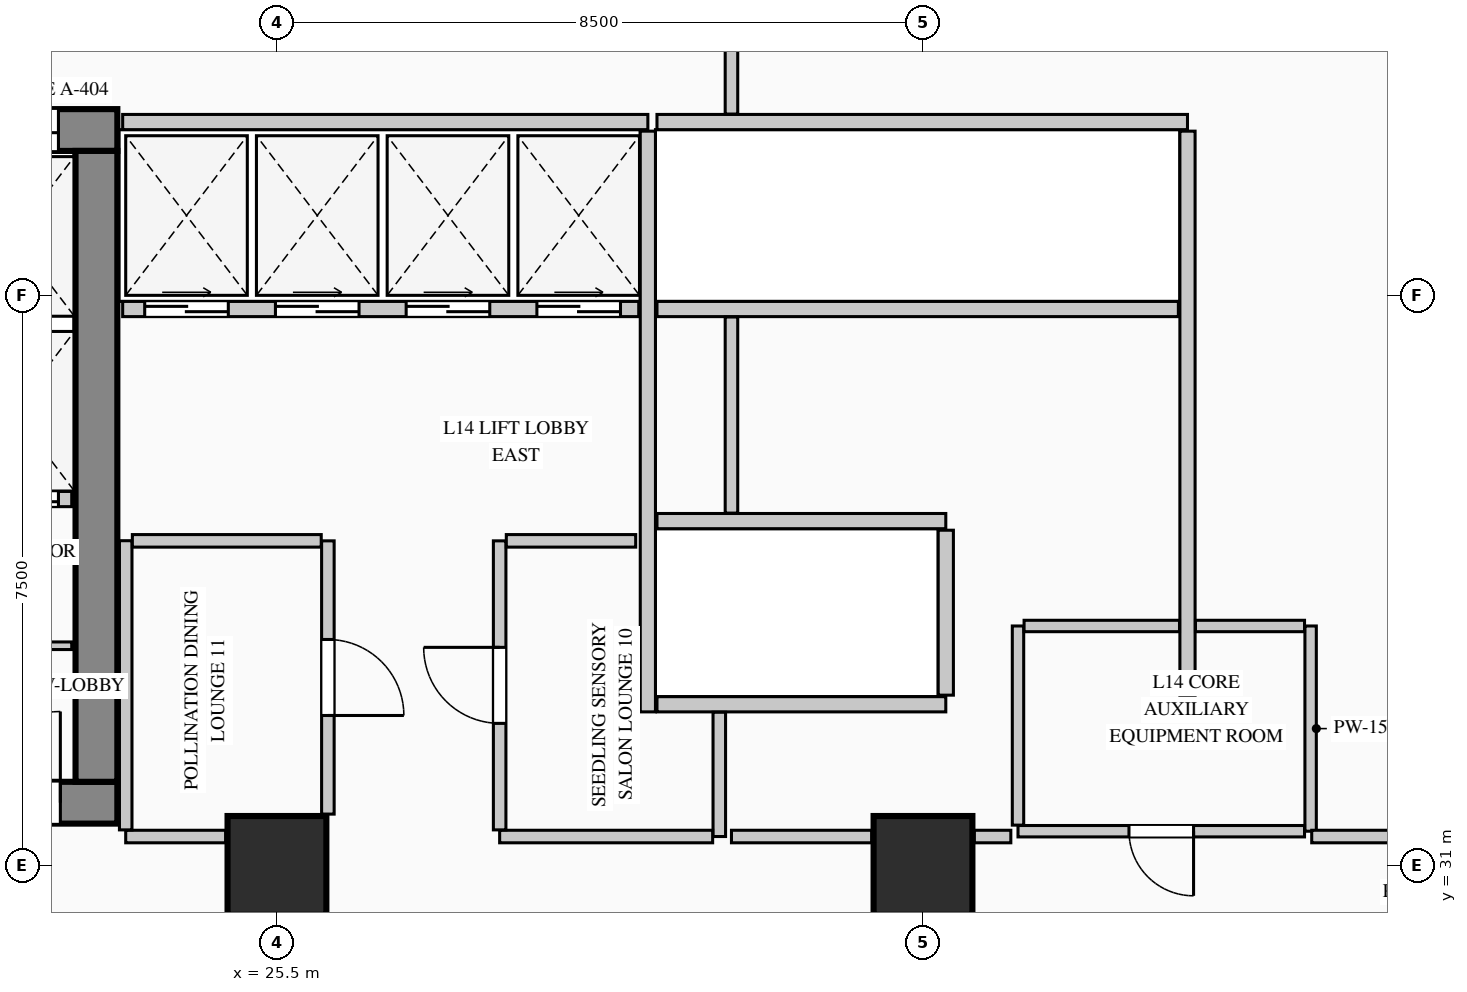
"""IFC4 building model, lengths in metres.
Left out: names, types, materials, properties, quantities, classifications, styles, units other than length and angle.
Written with IfcOpenShell. Run it as: python <this file> out.ifc"""

import sys

from ifc_helpers import new_model, si_unit, direction, frame, frame_2d, origin, origin_2d, place, context, subcontext, project, spatial, rectangle, extrude, element, fill, save


model = new_model("IFC4")
c1 = context("Model", 3, precision=1e-05, world=origin(), true_north=direction((0.0, 1.0)))
c2 = subcontext(c1, "Body", "Model", "MODEL_VIEW")
j1 = project(units=[si_unit("LENGTHUNIT", "METRE"), si_unit("PLANEANGLEUNIT", "RADIAN")], contexts=[c1])
p1 = place(None, origin())
s1 = spatial("IfcSite", under=j1, at=p1, CompositionType="ELEMENT")
p2 = place(p1, origin())
s2 = spatial("IfcBuilding", under=s1, at=p2, CompositionType="ELEMENT")
p3 = place(p2, frame((0.0, 0.0, 62.2)))
s3 = spatial("IfcBuildingStorey", under=s2, at=p3, CompositionType="ELEMENT", Elevation=62.2)
p4 = place(p3, frame((5.45, 40.675, 0.0), z_axis=(0.0, 0.0, 1.0), x_axis=(1.0, 0.0, 0.0)))
e1 = element("IfcWall", 1, at=p4, inside=s3, PredefinedType="SHEAR", context=c2, shape_type="SweptSolid", body=[
    extrude(rectangle(XDim=17.95, YDim=0.55, at=frame_2d((8.975, 0.0))), origin(), (0.0, 0.0, 1.0), 4.4),
])
p5 = place(p4, frame((15.995, 0.0, 0.0)))
e2 = element("IfcOpeningElement", 2, at=p5, cuts=e1, PredefinedType="OPENING", context=c2, shape_type="SweptSolid", body=[
    extrude(rectangle(XDim=1.18, YDim=2.25, at=frame_2d((0.59, 1.125))), frame((0.0, 0.285, 0.0), z_axis=(0.0, -1.0, 0.0), x_axis=(1.0, 0.0, 0.0)), (0.0, 0.0, 1.0), 0.57),
])
p6 = place(p3, frame((5.45, 31.825, 0.0), z_axis=(0.0, 0.0, 1.0), x_axis=(1.0, 0.0, 0.0)))
e3 = element("IfcWall", 3, at=p6, inside=s3, PredefinedType="SHEAR", context=c2, shape_type="SweptSolid", body=[
    extrude(rectangle(XDim=17.95, YDim=0.55, at=frame_2d((8.975, 0.0))), origin(), (0.0, 0.0, 1.0), 4.4),
])
p7 = place(p6, frame((3.2, 0.0, 0.0)))
e4 = element("IfcOpeningElement", 4, at=p7, cuts=e3, PredefinedType="OPENING", context=c2, shape_type="SweptSolid", body=[
    extrude(rectangle(XDim=1.2, YDim=2.2, at=frame_2d((0.6, 1.1))), frame((0.0, 0.285, 0.0), z_axis=(0.0, -1.0, 0.0), x_axis=(1.0, 0.0, 0.0)), (0.0, 0.0, 1.0), 0.57),
])
p8 = place(p6, frame((7.05, 0.0, 0.0)))
e5 = element("IfcOpeningElement", 5, at=p8, cuts=e3, PredefinedType="OPENING", context=c2, shape_type="SweptSolid", body=[
    extrude(rectangle(XDim=1.2, YDim=2.2, at=frame_2d((0.6, 1.1))), frame((0.0, 0.285, 0.0), z_axis=(0.0, -1.0, 0.0), x_axis=(1.0, 0.0, 0.0)), (0.0, 0.0, 1.0), 0.57),
])
p9 = place(p6, frame((8.9, 0.0, 0.0)))
e6 = element("IfcOpeningElement", 6, at=p9, cuts=e3, PredefinedType="OPENING", context=c2, shape_type="SweptSolid", body=[
    extrude(rectangle(XDim=1.15, YDim=2.2, at=frame_2d((0.575, 1.1))), frame((0.0, 0.285, 0.0), z_axis=(0.0, -1.0, 0.0), x_axis=(1.0, 0.0, 0.0)), (0.0, 0.0, 1.0), 0.57),
])
p10 = place(p6, frame((16.0, 0.0, 0.0)))
e7 = element("IfcOpeningElement", 7, at=p10, cuts=e3, PredefinedType="OPENING", context=c2, shape_type="SweptSolid", body=[
    extrude(rectangle(XDim=1.2, YDim=2.2, at=frame_2d((0.6, 1.1))), frame((0.0, 0.285, 0.0), z_axis=(0.0, -1.0, 0.0), x_axis=(1.0, 0.0, 0.0)), (0.0, 0.0, 1.0), 0.57),
])
p11 = place(p3, frame((23.125, 32.1, 0.0), z_axis=(0.0, 0.0, 1.0), x_axis=(0.0, 1.0, 0.0)))
e8 = element("IfcWall", 8, at=p11, inside=s3, PredefinedType="SHEAR", context=c2, shape_type="SweptSolid", body=[
    extrude(rectangle(XDim=8.3, YDim=0.55, at=frame_2d((4.15, 0.0))), origin(), (0.0, 0.0, 1.0), 4.4),
])
for number, where, z_axis, x_axis in (
    (9, (25.5, 31.0, 0.0), (0.0, 0.0, 1.0), (1.0, 0.0, 0.0)),
    (10, (34.0, 31.0, 0.0), (0.0, 0.0, 1.0), (1.0, 0.0, 0.0)),
):
    element("IfcColumn", number, at=place(p3, frame(where, z_axis=z_axis, x_axis=x_axis)), inside=s3, PredefinedType="COLUMN", context=c2, shape_type="SweptSolid", body=[
        extrude(rectangle(XDim=1.3, YDim=1.3, at=origin_2d()), origin(), (0.0, 0.0, 1.0), 4.4),
    ])
p12 = place(p3, frame((21.38, 33.89, 0.0), z_axis=(0.0, 0.0, 1.0), x_axis=(1.0, 0.0, 0.0)))
e11 = element("IfcWall", 11, at=p12, inside=s3, PredefinedType="PARTITIONING", context=c2, shape_type="SweptSolid", body=[
    extrude(rectangle(XDim=1.42, YDim=0.1, at=frame_2d((0.71, 0.0))), origin(), (0.0, 0.0, 1.0), 4.1),
])
p13 = place(p12, frame((0.28, 0.0, 0.0)))
e12 = element("IfcOpeningElement", 12, at=p13, cuts=e11, PredefinedType="OPENING", context=c2, shape_type="SweptSolid", body=[
    extrude(rectangle(XDim=0.85, YDim=2.1, at=frame_2d((0.425, 1.05))), frame((0.0, 0.06, 0.0), z_axis=(0.0, -1.0, 0.0), x_axis=(1.0, 0.0, 0.0)), (0.0, 0.0, 1.0), 0.12),
])
p14 = place(p3, frame((21.3, 35.82, 0.0), z_axis=(0.0, 0.0, 1.0), x_axis=(1.0, 0.0, 0.0)))
e13 = element("IfcWall", 13, at=p14, inside=s3, PredefinedType="PARTITIONING", context=c2, shape_type="SweptSolid", body=[
    extrude(rectangle(XDim=1.5, YDim=0.2, at=frame_2d((0.75, 0.0))), origin(), (0.0, 0.0, 1.0), 4.1),
])
p15 = place(p14, frame((0.145, 0.0, 0.0)))
e14 = element("IfcOpeningElement", 14, at=p15, cuts=e13, PredefinedType="OPENING", context=c2, shape_type="SweptSolid", body=[
    extrude(rectangle(XDim=1.18, YDim=2.25, at=frame_2d((0.59, 1.125))), frame((0.0, 0.11, 0.0), z_axis=(0.0, -1.0, 0.0), x_axis=(1.0, 0.0, 0.0)), (0.0, 0.0, 1.0), 0.22),
])
p16 = place(p3, frame((23.47, 40.78, 0.0), z_axis=(0.0, 0.0, 1.0), x_axis=(1.0, 0.0, 0.0)))
e15 = element("IfcWall", 15, at=p16, inside=s3, PredefinedType="PARTITIONING", context=c2, shape_type="SweptSolid", body=[
    extrude(rectangle(XDim=6.91, YDim=0.2, at=frame_2d((3.455, 0.0))), origin(), (0.0, 0.0, 1.0), 4.1),
])
p17 = place(p3, frame((30.38, 33.02, 0.0), z_axis=(0.0, 0.0, 1.0), x_axis=(0.0, 1.0, 0.0)))
e16 = element("IfcWall", 16, at=p17, inside=s3, PredefinedType="PARTITIONING", context=c2, shape_type="SweptSolid", body=[
    extrude(rectangle(XDim=7.64, YDim=0.2, at=frame_2d((3.82, 0.0))), origin(), (0.0, 0.0, 1.0), 4.1),
])
p18 = place(p3, frame((23.47, 38.32, 0.0), z_axis=(0.0, 0.0, 1.0), x_axis=(1.0, 0.0, 0.0)))
e17 = element("IfcWall", 17, at=p18, inside=s3, PredefinedType="PARTITIONING", context=c2, shape_type="SweptSolid", body=[
    extrude(rectangle(XDim=6.79, YDim=0.2, at=frame_2d((3.395, 0.0))), origin(), (0.0, 0.0, 1.0), 4.1),
])
p19 = place(p18, frame((0.29, 0.0, 0.0)))
e18 = element("IfcOpeningElement", 18, at=p19, cuts=e17, PredefinedType="OPENING", context=c2, shape_type="SweptSolid", body=[
    extrude(rectangle(XDim=1.1, YDim=2.2, at=frame_2d((0.55, 1.1))), frame((0.0, 0.11, 0.0), z_axis=(0.0, -1.0, 0.0), x_axis=(1.0, 0.0, 0.0)), (0.0, 0.0, 1.0), 0.22),
])
p20 = place(p18, frame((2.01, 0.0, 0.0)))
e19 = element("IfcOpeningElement", 19, at=p20, cuts=e17, PredefinedType="OPENING", context=c2, shape_type="SweptSolid", body=[
    extrude(rectangle(XDim=1.1, YDim=2.2, at=frame_2d((0.55, 1.1))), frame((0.0, 0.11, 0.0), z_axis=(0.0, -1.0, 0.0), x_axis=(1.0, 0.0, 0.0)), (0.0, 0.0, 1.0), 0.22),
])
p21 = place(p18, frame((3.73, 0.0, 0.0)))
e20 = element("IfcOpeningElement", 20, at=p21, cuts=e17, PredefinedType="OPENING", context=c2, shape_type="SweptSolid", body=[
    extrude(rectangle(XDim=1.1, YDim=2.2, at=frame_2d((0.55, 1.1))), frame((0.0, 0.11, 0.0), z_axis=(0.0, -1.0, 0.0), x_axis=(1.0, 0.0, 0.0)), (0.0, 0.0, 1.0), 0.22),
])
p22 = place(p18, frame((5.45, 0.0, 0.0)))
e21 = element("IfcOpeningElement", 21, at=p22, cuts=e17, PredefinedType="OPENING", context=c2, shape_type="SweptSolid", body=[
    extrude(rectangle(XDim=1.1, YDim=2.2, at=frame_2d((0.55, 1.1))), frame((0.0, 0.11, 0.0), z_axis=(0.0, -1.0, 0.0), x_axis=(1.0, 0.0, 0.0)), (0.0, 0.0, 1.0), 0.22),
])
p23 = place(p3, frame((30.5, 40.78, 0.0), z_axis=(0.0, 0.0, 1.0), x_axis=(1.0, 0.0, 0.0)))
e22 = element("IfcWall", 22, at=p23, inside=s3, PredefinedType="PARTITIONING", context=c2, shape_type="SweptSolid", body=[
    extrude(rectangle(XDim=6.98, YDim=0.2, at=frame_2d((3.49, 0.0))), origin(), (0.0, 0.0, 1.0), 4.1),
])
p24 = place(p3, frame((37.48, 33.24, 0.0), z_axis=(0.0, 0.0, 1.0), x_axis=(0.0, 1.0, 0.0)))
e23 = element("IfcWall", 23, at=p24, inside=s3, PredefinedType="PARTITIONING", context=c2, shape_type="SweptSolid", body=[
    extrude(rectangle(XDim=7.42, YDim=0.2, at=frame_2d((3.71, 0.0))), origin(), (0.0, 0.0, 1.0), 4.1),
])
p25 = place(p3, frame((30.5, 38.32, 0.0), z_axis=(0.0, 0.0, 1.0), x_axis=(1.0, 0.0, 0.0)))
e24 = element("IfcWall", 24, at=p25, inside=s3, PredefinedType="PARTITIONING", context=c2, shape_type="SweptSolid", body=[
    extrude(rectangle(XDim=6.86, YDim=0.2, at=frame_2d((3.43, 0.0))), origin(), (0.0, 0.0, 1.0), 4.1),
])
for number, where, z_axis, x_axis in (
    (25, (30.5, 35.53, 0.0), (0.0, 0.0, 1.0), (1.0, 0.0, 0.0)),
    (26, (30.5, 33.12, 0.0), (0.0, 0.0, 1.0), (1.0, 0.0, 0.0)),
):
    element("IfcWall", number, at=place(p3, frame(where, z_axis=z_axis, x_axis=x_axis)), inside=s3, PredefinedType="PARTITIONING", context=c2, shape_type="SweptSolid", body=[
        extrude(rectangle(XDim=3.8, YDim=0.2, at=frame_2d((1.9, 0.0))), origin(), (0.0, 0.0, 1.0), 4.1),
    ])
p26 = place(p3, frame((34.3, 33.24, 0.0), z_axis=(0.0, 0.0, 1.0), x_axis=(0.0, 1.0, 0.0)))
e27 = element("IfcWall", 27, at=p26, inside=s3, PredefinedType="PARTITIONING", context=c2, shape_type="SweptSolid", body=[
    extrude(rectangle(XDim=2.17, YDim=0.2, at=frame_2d((1.085, 0.0))), origin(), (0.0, 0.0, 1.0), 4.1),
])
p27 = place(p3, frame((39.1, 34.15, 0.0), z_axis=(0.0, 0.0, 1.0), x_axis=(0.0, -1.0, 0.0)))
e28 = element("IfcWall", 28, at=p27, inside=s3, PredefinedType="PARTITIONING", context=c2, shape_type="SweptSolid", body=[
    extrude(rectangle(XDim=2.7, YDim=0.15, at=frame_2d((1.35, 0.0))), origin(), (0.0, 0.0, 1.0), 4.1),
])
p28 = place(p3, frame((39.02, 31.45, 0.0), z_axis=(0.0, 0.0, 1.0), x_axis=(-1.0, 0.0, 0.0)))
e29 = element("IfcWall", 29, at=p28, inside=s3, PredefinedType="PARTITIONING", context=c2, shape_type="SweptSolid", body=[
    extrude(rectangle(XDim=3.77, YDim=0.15, at=frame_2d((1.885, 0.0))), origin(), (0.0, 0.0, 1.0), 4.1),
])
p29 = place(p28, frame((1.46, 0.0, 0.0)))
e30 = element("IfcOpeningElement", 30, at=p29, cuts=e29, PredefinedType="OPENING", context=c2, shape_type="SweptSolid", body=[
    extrude(rectangle(XDim=0.85, YDim=2.1, at=frame_2d((0.425, 1.05))), frame((0.0, 0.085, 0.0), z_axis=(0.0, -1.0, 0.0), x_axis=(1.0, 0.0, 0.0)), (0.0, 0.0, 1.0), 0.17),
])
p30 = place(p3, frame((35.25, 31.53, 0.0), z_axis=(0.0, 0.0, 1.0), x_axis=(0.0, 1.0, 0.0)))
e31 = element("IfcWall", 31, at=p30, inside=s3, PredefinedType="PARTITIONING", context=c2, shape_type="SweptSolid", body=[
    extrude(rectangle(XDim=2.62, YDim=0.15, at=frame_2d((1.31, 0.0))), origin(), (0.0, 0.0, 1.0), 4.1),
])
p31 = place(p3, frame((37.585, 34.15, 0.0), z_axis=(0.0, 0.0, 1.0), x_axis=(1.0, 0.0, 0.0)))
e32 = element("IfcWall", 32, at=p31, inside=s3, PredefinedType="PARTITIONING", context=c2, shape_type="SweptSolid", body=[
    extrude(rectangle(XDim=1.435, YDim=0.15, at=frame_2d((0.718, 0.0))), origin(), (0.0, 0.0, 1.0), 4.1),
])
p32 = place(p3, frame((35.33, 34.15, 0.0), z_axis=(0.0, 0.0, 1.0), x_axis=(1.0, 0.0, 0.0)))
e33 = element("IfcWall", 33, at=p32, inside=s3, PredefinedType="PARTITIONING", context=c2, shape_type="SweptSolid", body=[
    extrude(rectangle(XDim=2.045, YDim=0.15, at=frame_2d((1.022, 0.0))), origin(), (0.0, 0.0, 1.0), 4.1),
])
p33 = place(p3, frame((31.32, 33.015, 0.0), z_axis=(0.0, 0.0, 1.0), x_axis=(0.0, -1.0, 0.0)))
e34 = element("IfcWall", 34, at=p33, inside=s3, PredefinedType="PARTITIONING", context=c2, shape_type="SweptSolid", body=[
    extrude(rectangle(XDim=1.635, YDim=0.165, at=frame_2d((0.817, 0.0))), origin(), (0.0, 0.0, 1.0), 4.1),
])
p34 = place(p3, frame((31.232, 31.38, 0.0), z_axis=(0.0, 0.0, 1.0), x_axis=(-1.0, 0.0, 0.0)))
e35 = element("IfcWall", 35, at=p34, inside=s3, PredefinedType="PARTITIONING", context=c2, shape_type="SweptSolid", body=[
    extrude(rectangle(XDim=2.802, YDim=0.165, at=frame_2d((1.401, 0.0))), origin(), (0.0, 0.0, 1.0), 4.1),
])
p35 = place(p3, frame((28.43, 31.468, 0.0), z_axis=(0.0, 0.0, 1.0), x_axis=(0.0, 1.0, 0.0)))
e36 = element("IfcWall", 36, at=p35, inside=s3, PredefinedType="PARTITIONING", context=c2, shape_type="SweptSolid", body=[
    extrude(rectangle(XDim=3.802, YDim=0.165, at=frame_2d((1.901, 0.0))), origin(), (0.0, 0.0, 1.0), 4.1),
])
p36 = place(p35, frame((1.401, 0.0, 0.0)))
e37 = element("IfcOpeningElement", 37, at=p36, cuts=e36, PredefinedType="OPENING", context=c2, shape_type="SweptSolid", body=[
    extrude(rectangle(XDim=1.0, YDim=2.15, at=frame_2d((0.5, 1.075))), frame((0.0, 0.093, 0.0), z_axis=(0.0, -1.0, 0.0), x_axis=(1.0, 0.0, 0.0)), (0.0, 0.0, 1.0), 0.185),
])
p37 = place(p3, frame((28.518, 35.27, 0.0), z_axis=(0.0, 0.0, 1.0), x_axis=(1.0, 0.0, 0.0)))
e38 = element("IfcWall", 38, at=p37, inside=s3, PredefinedType="PARTITIONING", context=c2, shape_type="SweptSolid", body=[
    extrude(rectangle(XDim=1.702, YDim=0.165, at=frame_2d((0.851, 0.0))), origin(), (0.0, 0.0, 1.0), 4.1),
])
p38 = place(p3, frame((26.17, 35.27, 0.0), z_axis=(0.0, 0.0, 1.0), x_axis=(0.0, -1.0, 0.0)))
e39 = element("IfcWall", 39, at=p38, inside=s3, PredefinedType="PARTITIONING", context=c2, shape_type="SweptSolid", body=[
    extrude(rectangle(XDim=3.595, YDim=0.165, at=frame_2d((1.797, 0.0))), origin(), (0.0, 0.0, 1.0), 4.1),
])
p39 = place(p38, frame((1.298, 0.0, 0.0)))
e40 = element("IfcOpeningElement", 40, at=p39, cuts=e39, PredefinedType="OPENING", context=c2, shape_type="SweptSolid", body=[
    extrude(rectangle(XDim=1.0, YDim=2.15, at=frame_2d((0.5, 1.075))), frame((0.0, 0.093, 0.0), z_axis=(0.0, -1.0, 0.0), x_axis=(1.0, 0.0, 0.0)), (0.0, 0.0, 1.0), 0.185),
])
p40 = place(p3, frame((24.825, 31.38, 0.0), z_axis=(0.0, 0.0, 1.0), x_axis=(-1.0, 0.0, 0.0)))
e41 = element("IfcWall", 41, at=p40, inside=s3, PredefinedType="PARTITIONING", context=c2, shape_type="SweptSolid", body=[
    extrude(rectangle(XDim=1.315, YDim=0.165, at=frame_2d((0.657, 0.0))), origin(), (0.0, 0.0, 1.0), 4.1),
])
p41 = place(p3, frame((23.51, 31.468, 0.0), z_axis=(0.0, 0.0, 1.0), x_axis=(0.0, 1.0, 0.0)))
e42 = element("IfcWall", 42, at=p41, inside=s3, PredefinedType="PARTITIONING", context=c2, shape_type="SweptSolid", body=[
    extrude(rectangle(XDim=3.804, YDim=0.165, at=frame_2d((1.902, 0.0))), origin(), (0.0, 0.0, 1.0), 4.1),
])
p42 = place(p3, frame((23.597, 35.27, 0.0), z_axis=(0.0, 0.0, 1.0), x_axis=(1.0, 0.0, 0.0)))
e43 = element("IfcWall", 43, at=p42, inside=s3, PredefinedType="PARTITIONING", context=c2, shape_type="SweptSolid", body=[
    extrude(rectangle(XDim=2.485, YDim=0.165, at=frame_2d((1.243, 0.0))), origin(), (0.0, 0.0, 1.0), 4.1),
])
p43 = place(p3, frame((31.48, 35.635, 0.0), z_axis=(0.0, 0.0, 1.0), x_axis=(0.0, 1.0, 0.0)))
e44 = element("IfcWall", 44, at=p43, inside=s3, PredefinedType="PARTITIONING", context=c2, shape_type="SweptSolid", body=[
    extrude(rectangle(XDim=2.58, YDim=0.165, at=frame_2d((1.29, 0.0))), origin(), (0.0, 0.0, 1.0), 4.1),
])
p44 = place(p3, frame((31.48, 40.885, 0.0), z_axis=(0.0, 0.0, 1.0), x_axis=(0.0, 1.0, 0.0)))
e45 = element("IfcWall", 45, at=p44, inside=s3, PredefinedType="PARTITIONING", context=c2, shape_type="SweptSolid", body=[
    extrude(rectangle(XDim=2.33, YDim=0.165, at=frame_2d((1.165, 0.0))), origin(), (0.0, 0.0, 1.0), 4.1),
])
p45 = place(p3, frame((41.825, 31.38, 0.0), z_axis=(0.0, 0.0, 1.0), x_axis=(-1.0, 0.0, 0.0)))
e46 = element("IfcWall", 46, at=p45, inside=s3, PredefinedType="PARTITIONING", context=c2, shape_type="SweptSolid", body=[
    extrude(rectangle(XDim=2.71, YDim=0.165, at=frame_2d((1.355, 0.0))), origin(), (0.0, 0.0, 1.0), 4.1),
])
p46 = place(p3, frame((35.156, 31.38, 0.0), z_axis=(0.0, 0.0, 1.0), x_axis=(-1.0, 0.0, 0.0)))
e47 = element("IfcWall", 47, at=p46, inside=s3, PredefinedType="PARTITIONING", context=c2, shape_type="SweptSolid", body=[
    extrude(rectangle(XDim=0.48, YDim=0.165, at=frame_2d((0.24, 0.0))), origin(), (0.0, 0.0, 1.0), 4.1),
])
p47 = place(p3, frame((33.325, 31.38, 0.0), z_axis=(0.0, 0.0, 1.0), x_axis=(-1.0, 0.0, 0.0)))
e48 = element("IfcWall", 48, at=p47, inside=s3, PredefinedType="PARTITIONING", context=c2, shape_type="SweptSolid", body=[
    extrude(rectangle(XDim=1.845, YDim=0.165, at=frame_2d((0.922, 0.0))), origin(), (0.0, 0.0, 1.0), 4.1),
])
p48 = place(p10, origin())
e49 = element("IfcDoor", 49, at=p48, inside=s3, OperationType="SINGLE_SWING_RIGHT", PredefinedType="DOOR", context=c2, shape_type="SweptSolid", body=[
    extrude(rectangle(XDim=1.2, YDim=2.2, at=frame_2d((0.6, 1.1))), frame((0.0, 0.025, 0.0), z_axis=(0.0, -1.0, 0.0), x_axis=(1.0, 0.0, 0.0)), (0.0, 0.0, 1.0), 0.05),
])
fill(e7, e49)
p49 = place(p5, origin())
e50 = element("IfcDoor", 50, at=p49, inside=s3, OperationType="DOUBLE_DOOR_SLIDING", PredefinedType="DOOR", context=c2, shape_type="SweptSolid", body=[
    extrude(rectangle(XDim=1.18, YDim=2.25, at=frame_2d((0.59, 1.125))), frame((0.0, 0.025, 0.0), z_axis=(0.0, -1.0, 0.0), x_axis=(1.0, 0.0, 0.0)), (0.0, 0.0, 1.0), 0.05),
])
fill(e2, e50)
p50 = place(p15, origin())
e51 = element("IfcDoor", 51, at=p50, inside=s3, OperationType="DOUBLE_DOOR_SLIDING", PredefinedType="DOOR", context=c2, shape_type="SweptSolid", body=[
    extrude(rectangle(XDim=1.18, YDim=2.25, at=frame_2d((0.59, 1.125))), frame((0.0, 0.025, 0.0), z_axis=(0.0, -1.0, 0.0), x_axis=(1.0, 0.0, 0.0)), (0.0, 0.0, 1.0), 0.05),
])
fill(e14, e51)
p51 = place(p19, origin())
e52 = element("IfcDoor", 52, at=p51, inside=s3, OperationType="DOUBLE_DOOR_SLIDING", PredefinedType="DOOR", context=c2, shape_type="SweptSolid", body=[
    extrude(rectangle(XDim=1.1, YDim=2.2, at=frame_2d((0.55, 1.1))), frame((0.0, 0.025, 0.0), z_axis=(0.0, -1.0, 0.0), x_axis=(1.0, 0.0, 0.0)), (0.0, 0.0, 1.0), 0.05),
])
fill(e18, e52)
p52 = place(p20, origin())
e53 = element("IfcDoor", 53, at=p52, inside=s3, OperationType="DOUBLE_DOOR_SLIDING", PredefinedType="DOOR", context=c2, shape_type="SweptSolid", body=[
    extrude(rectangle(XDim=1.1, YDim=2.2, at=frame_2d((0.55, 1.1))), frame((0.0, 0.025, 0.0), z_axis=(0.0, -1.0, 0.0), x_axis=(1.0, 0.0, 0.0)), (0.0, 0.0, 1.0), 0.05),
])
fill(e19, e53)
p53 = place(p21, origin())
e54 = element("IfcDoor", 54, at=p53, inside=s3, OperationType="DOUBLE_DOOR_SLIDING", PredefinedType="DOOR", context=c2, shape_type="SweptSolid", body=[
    extrude(rectangle(XDim=1.1, YDim=2.2, at=frame_2d((0.55, 1.1))), frame((0.0, 0.025, 0.0), z_axis=(0.0, -1.0, 0.0), x_axis=(1.0, 0.0, 0.0)), (0.0, 0.0, 1.0), 0.05),
])
fill(e20, e54)
p54 = place(p22, origin())
e55 = element("IfcDoor", 55, at=p54, inside=s3, OperationType="DOUBLE_DOOR_SLIDING", PredefinedType="DOOR", context=c2, shape_type="SweptSolid", body=[
    extrude(rectangle(XDim=1.1, YDim=2.2, at=frame_2d((0.55, 1.1))), frame((0.0, 0.025, 0.0), z_axis=(0.0, -1.0, 0.0), x_axis=(1.0, 0.0, 0.0)), (0.0, 0.0, 1.0), 0.05),
])
fill(e21, e55)
p55 = place(p29, origin())
e56 = element("IfcDoor", 56, at=p55, inside=s3, OperationType="SINGLE_SWING_LEFT", PredefinedType="DOOR", context=c2, shape_type="SweptSolid", body=[
    extrude(rectangle(XDim=0.85, YDim=2.1, at=frame_2d((0.425, 1.05))), frame((0.0, 0.025, 0.0), z_axis=(0.0, -1.0, 0.0), x_axis=(1.0, 0.0, 0.0)), (0.0, 0.0, 1.0), 0.05),
])
fill(e30, e56)
p56 = place(p36, origin())
e57 = element("IfcDoor", 57, at=p56, inside=s3, OperationType="SINGLE_SWING_RIGHT", PredefinedType="DOOR", context=c2, shape_type="SweptSolid", body=[
    extrude(rectangle(XDim=1.0, YDim=2.15, at=frame_2d((0.5, 1.075))), frame((0.0, 0.025, 0.0), z_axis=(0.0, -1.0, 0.0), x_axis=(1.0, 0.0, 0.0)), (0.0, 0.0, 1.0), 0.05),
])
fill(e37, e57)
p57 = place(p39, origin())
e58 = element("IfcDoor", 58, at=p57, inside=s3, OperationType="SINGLE_SWING_RIGHT", PredefinedType="DOOR", context=c2, shape_type="SweptSolid", body=[
    extrude(rectangle(XDim=1.0, YDim=2.15, at=frame_2d((0.5, 1.075))), frame((0.0, 0.025, 0.0), z_axis=(0.0, -1.0, 0.0), x_axis=(1.0, 0.0, 0.0)), (0.0, 0.0, 1.0), 0.05),
])
fill(e40, e58)
save(model, sys.argv[1])
